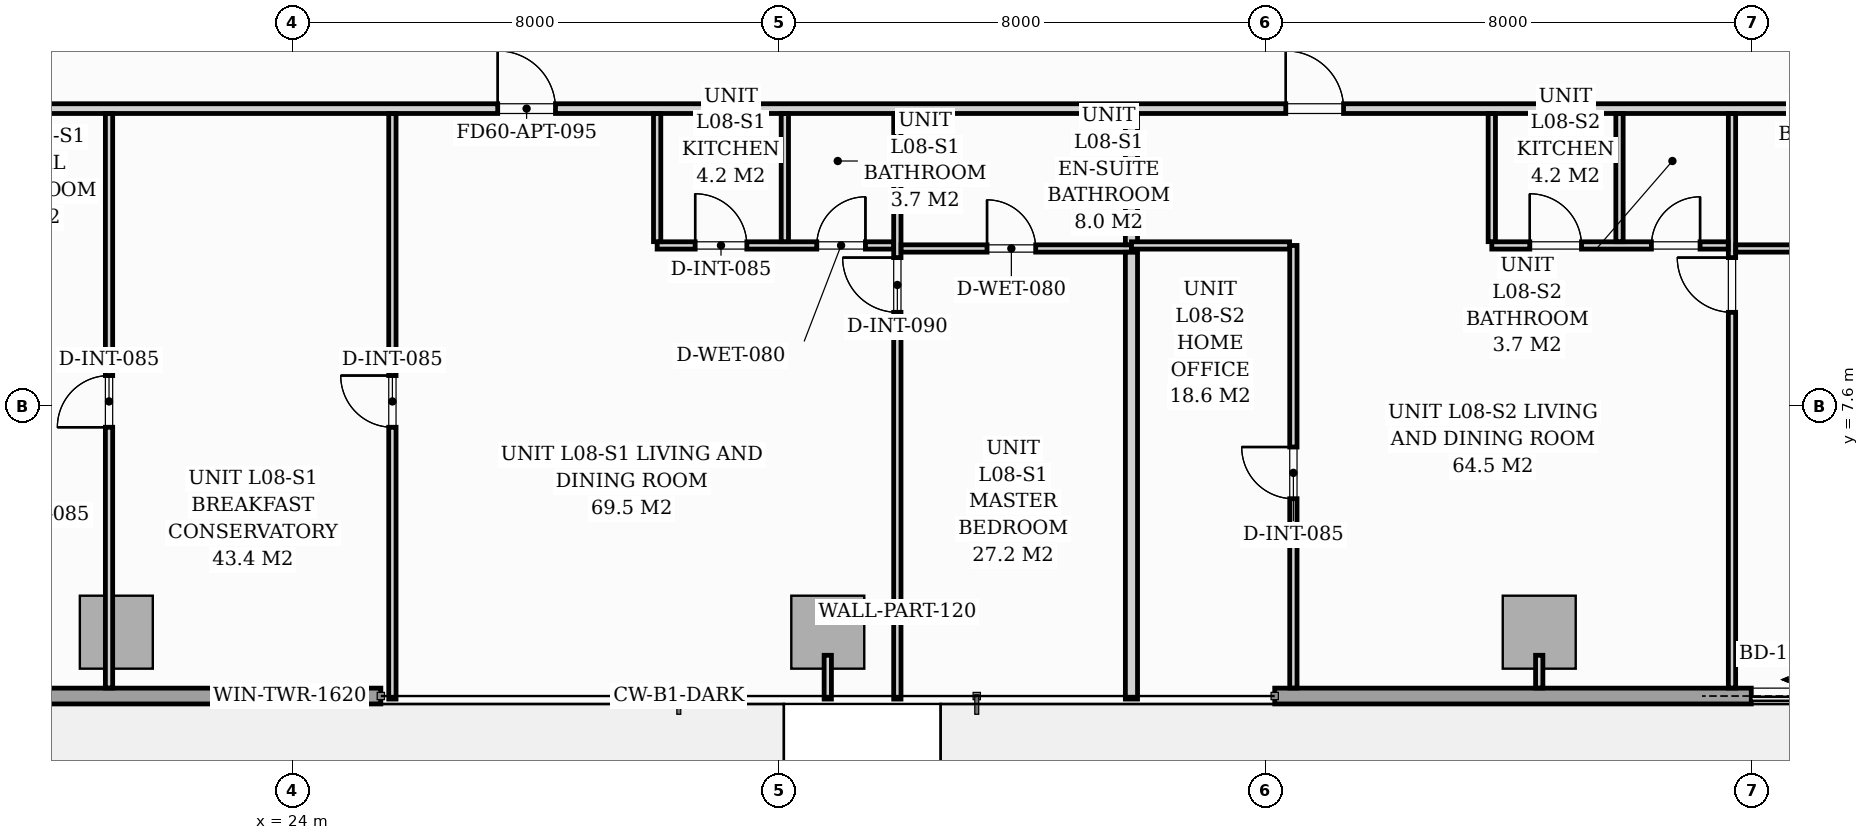
"""IFC4 building model, lengths in metres.
Left out: names, types, materials, properties, quantities, classifications, styles, units other than length and angle.
Written with IfcOpenShell. Run it as: python <this file> out.ifc"""

import sys

from ifc_helpers import new_model, si_unit, direction, frame, frame_2d, origin, origin_2d, place, context, subcontext, project, spatial, rectangle, extrude, source, transform, mapped, element, fill, save


model = new_model("IFC4")
c1 = context("Model", 3, precision=1e-05, world=origin(), true_north=direction((0.0, 1.0)))
c2 = subcontext(c1, "Body", "Model", "MODEL_VIEW")
j1 = project(units=[si_unit("LENGTHUNIT", "METRE"), si_unit("PLANEANGLEUNIT", "RADIAN")], contexts=[c1])
p1 = place(None, origin())
s1 = spatial("IfcSite", under=j1, at=p1, CompositionType="ELEMENT")
p2 = place(p1, origin())
s2 = spatial("IfcBuilding", under=s1, at=p2, CompositionType="ELEMENT")
p3 = place(p2, frame((0.0, 0.0, 32.6)))
s3 = spatial("IfcBuildingStorey", under=s2, at=p3, CompositionType="ELEMENT", Elevation=32.6)
m1 = source(origin(), c2, "Body", "SweptSolid", [
    extrude(rectangle(XDim=1.2, YDim=1.2, at=origin_2d()), origin(), (0.0, 0.0, 1.0), 3.196),
])
for number, where, z_axis, x_axis in (
    (1, (21.1, 3.88, 0.002), (0.0, 0.0, 1.0), (1.0, 0.0, 0.0)),
    (2, (32.8, 3.88, 0.002), (0.0, 0.0, 1.0), (1.0, 0.0, 0.0)),
    (3, (44.5, 3.88, 0.002), (0.0, 0.0, 1.0), (1.0, 0.0, 0.0)),
):
    element("IfcColumn", number, at=place(p3, frame(where, z_axis=z_axis, x_axis=x_axis)), inside=s3, PredefinedType="COLUMN", context=c2, shape_type="MappedRepresentation", body=[
        mapped(m1, transform((0.0, 0.0, 0.0), scale=1.0)),
    ])
p4 = place(p3, frame((57.3, 2.83, 0.0), z_axis=(0.0, 0.0, 1.0), x_axis=(-1.0, 0.0, 0.0)))
e4 = element("IfcWall", 4, at=p4, inside=s3, PredefinedType="STANDARD", context=c2, shape_type="SweptSolid", body=[
    extrude(rectangle(XDim=17.15, YDim=0.26, at=frame_2d((8.575, 0.0))), origin(), (0.0, 0.0, 1.0), 2.94),
])
p5 = place(p4, frame((7.513, 0.0, 0.0)))
e5 = element("IfcOpeningElement", 5, at=p5, cuts=e4, PredefinedType="OPENING", context=c2, shape_type="SweptSolid", body=[
    extrude(rectangle(XDim=1.8, YDim=2.06, at=frame_2d((0.9, 1.03))), frame((0.0, 0.14, 0.0), z_axis=(0.0, -1.0, 0.0), x_axis=(1.0, 0.0, 0.0)), (0.0, 0.0, 1.0), 0.28),
])
p6 = place(p4, frame((2.05, 0.0, 0.65)))
e6 = element("IfcOpeningElement", 6, at=p6, cuts=e4, PredefinedType="OPENING", context=c2, shape_type="SweptSolid", body=[
    extrude(rectangle(XDim=1.6, YDim=1.5, at=frame_2d((0.8, 0.75))), frame((0.0, 0.14, 0.0), z_axis=(0.0, -1.0, 0.0), x_axis=(1.0, 0.0, 0.0)), (0.0, 0.0, 1.0), 0.28),
])
p7 = place(p3, frame((25.45, 2.83, 0.0), z_axis=(0.0, 0.0, 1.0), x_axis=(-1.0, 0.0, 0.0)))
e7 = element("IfcWall", 7, at=p7, inside=s3, PredefinedType="STANDARD", context=c2, shape_type="SweptSolid", body=[
    extrude(rectangle(XDim=17.15, YDim=0.26, at=frame_2d((8.575, 0.0))), origin(), (0.0, 0.0, 1.0), 2.94),
])
p8 = place(p7, frame((6.93, 0.0, 0.0)))
e8 = element("IfcOpeningElement", 8, at=p8, cuts=e7, PredefinedType="OPENING", context=c2, shape_type="SweptSolid", body=[
    extrude(rectangle(XDim=1.8, YDim=2.06, at=frame_2d((0.9, 1.03))), frame((0.0, 0.14, 0.0), z_axis=(0.0, -1.0, 0.0), x_axis=(1.0, 0.0, 0.0)), (0.0, 0.0, 1.0), 0.28),
])
p9 = place(p7, frame((0.7, 0.0, 0.65)))
e9 = element("IfcOpeningElement", 9, at=p9, cuts=e7, PredefinedType="OPENING", context=c2, shape_type="SweptSolid", body=[
    extrude(rectangle(XDim=1.6, YDim=1.5, at=frame_2d((0.8, 0.75))), frame((0.0, 0.14, 0.0), z_axis=(0.0, -1.0, 0.0), x_axis=(1.0, 0.0, 0.0)), (0.0, 0.0, 1.0), 0.28),
])
p10 = place(p3, frame((16.3, 12.49, 0.0), z_axis=(0.0, 0.0, 1.0), x_axis=(1.0, 0.0, 0.0)))
e10 = element("IfcWall", 10, at=p10, inside=s3, PredefinedType="PARTITIONING", context=c2, shape_type="SweptSolid", body=[
    extrude(rectangle(XDim=35.2, YDim=0.16, at=frame_2d((17.6, 0.0))), origin(), (0.0, 0.0, 1.0), 2.94),
])
p11 = place(p10, frame((11.072, 0.0, 0.0)))
e11 = element("IfcOpeningElement", 11, at=p11, cuts=e10, PredefinedType="OPENING", context=c2, shape_type="SweptSolid", body=[
    extrude(rectangle(XDim=0.95, YDim=2.06, at=frame_2d((0.475, 1.03))), frame((0.0, 0.09, 0.0), z_axis=(0.0, -1.0, 0.0), x_axis=(1.0, 0.0, 0.0)), (0.0, 0.0, 1.0), 0.18),
])
p12 = place(p10, frame((24.032, 0.0, 0.0)))
e12 = element("IfcOpeningElement", 12, at=p12, cuts=e10, PredefinedType="OPENING", context=c2, shape_type="SweptSolid", body=[
    extrude(rectangle(XDim=0.95, YDim=2.06, at=frame_2d((0.475, 1.03))), frame((0.0, 0.09, 0.0), z_axis=(0.0, -1.0, 0.0), x_axis=(1.0, 0.0, 0.0)), (0.0, 0.0, 1.0), 0.18),
])
p13 = place(p3, frame((33.944, 2.78, 0.0), z_axis=(0.0, 0.0, 1.0), x_axis=(0.0, 1.0, 0.0)))
e13 = element("IfcWall", 13, at=p13, inside=s3, PredefinedType="PARTITIONING", context=c2, shape_type="SweptSolid", body=[
    extrude(rectangle(XDim=9.628, YDim=0.12, at=frame_2d((4.814, 0.0))), origin(), (0.0, 0.0, 1.0), 2.94),
])
p14 = place(p13, frame((6.36, 0.0, 0.0)))
e14 = element("IfcOpeningElement", 14, at=p14, cuts=e13, PredefinedType="OPENING", context=c2, shape_type="SweptSolid", body=[
    extrude(rectangle(XDim=0.9, YDim=2.05, at=frame_2d((0.45, 1.025))), frame((0.0, 0.07, 0.0), z_axis=(0.0, -1.0, 0.0), x_axis=(1.0, 0.0, 0.0)), (0.0, 0.0, 1.0), 0.14),
])
p15 = place(p3, frame((29.994, 10.24, 0.0), z_axis=(0.0, 0.0, 1.0), x_axis=(1.0, 0.0, 0.0)))
e15 = element("IfcWall", 15, at=p15, inside=s3, PredefinedType="PARTITIONING", context=c2, shape_type="SweptSolid", body=[
    extrude(rectangle(XDim=3.888, YDim=0.12, at=frame_2d((1.944, 0.0))), origin(), (0.0, 0.0, 1.0), 2.94),
])
p16 = place(p15, frame((0.625, 0.0, 0.0)))
e16 = element("IfcOpeningElement", 16, at=p16, cuts=e15, PredefinedType="OPENING", context=c2, shape_type="SweptSolid", body=[
    extrude(rectangle(XDim=0.85, YDim=2.05, at=frame_2d((0.425, 1.025))), frame((0.0, 0.07, 0.0), z_axis=(0.0, -1.0, 0.0), x_axis=(1.0, 0.0, 0.0)), (0.0, 0.0, 1.0), 0.14),
])
p17 = place(p15, frame((2.625, 0.0, 0.0)))
e17 = element("IfcOpeningElement", 17, at=p17, cuts=e15, PredefinedType="OPENING", context=c2, shape_type="SweptSolid", body=[
    extrude(rectangle(XDim=0.8, YDim=2.02, at=frame_2d((0.4, 1.01))), frame((0.0, 0.07, 0.0), z_axis=(0.0, -1.0, 0.0), x_axis=(1.0, 0.0, 0.0)), (0.0, 0.0, 1.0), 0.14),
])
for number, where, z_axis, x_axis in (
    (18, (32.094, 10.302, 0.0), (0.0, 0.0, 1.0), (0.0, 1.0, 0.0)),
    (19, (29.994, 10.302, 0.0), (0.0, 0.0, 1.0), (0.0, 1.0, 0.0)),
):
    element("IfcWall", number, at=place(p3, frame(where, z_axis=z_axis, x_axis=x_axis)), inside=s3, PredefinedType="PARTITIONING", context=c2, shape_type="SweptSolid", body=[
        extrude(rectangle(XDim=2.106, YDim=0.12, at=frame_2d((1.053, 0.0))), origin(), (0.0, 0.0, 1.0), 2.94),
    ])
p18 = place(p3, frame((34.006, 10.19, 0.0), z_axis=(0.0, 0.0, 1.0), x_axis=(1.0, 0.0, 0.0)))
e20 = element("IfcWall", 20, at=p18, inside=s3, PredefinedType="PARTITIONING", context=c2, shape_type="SweptSolid", body=[
    extrude(rectangle(XDim=3.788, YDim=0.12, at=frame_2d((1.894, 0.0))), origin(), (0.0, 0.0, 1.0), 2.94),
])
p19 = place(p18, frame((1.413, 0.0, 0.0)))
e21 = element("IfcOpeningElement", 21, at=p19, cuts=e20, PredefinedType="OPENING", context=c2, shape_type="SweptSolid", body=[
    extrude(rectangle(XDim=0.8, YDim=2.02, at=frame_2d((0.4, 1.01))), frame((0.0, 0.07, 0.0), z_axis=(0.0, -1.0, 0.0), x_axis=(1.0, 0.0, 0.0)), (0.0, 0.0, 1.0), 0.14),
])
p20 = place(p3, frame((20.98, 2.962, 0.0), z_axis=(0.0, 0.0, 1.0), x_axis=(0.0, 1.0, 0.0)))
e22 = element("IfcWall", 22, at=p20, inside=s3, PredefinedType="PARTITIONING", context=c2, shape_type="SweptSolid", body=[
    extrude(rectangle(XDim=9.446, YDim=0.12, at=frame_2d((4.723, 0.0))), origin(), (0.0, 0.0, 1.0), 2.94),
])
p21 = place(p20, frame((4.288, 0.0, 0.0)))
e23 = element("IfcOpeningElement", 23, at=p21, cuts=e22, PredefinedType="OPENING", context=c2, shape_type="SweptSolid", body=[
    extrude(rectangle(XDim=0.85, YDim=2.05, at=frame_2d((0.425, 1.025))), frame((0.0, 0.07, 0.0), z_axis=(0.0, -1.0, 0.0), x_axis=(1.0, 0.0, 0.0)), (0.0, 0.0, 1.0), 0.14),
])
p22 = place(p3, frame((25.64, 2.78, 0.0), z_axis=(0.0, 0.0, 1.0), x_axis=(0.0, 1.0, 0.0)))
e24 = element("IfcWall", 24, at=p22, inside=s3, PredefinedType="PARTITIONING", context=c2, shape_type="SweptSolid", body=[
    extrude(rectangle(XDim=9.628, YDim=0.12, at=frame_2d((4.814, 0.0))), origin(), (0.0, 0.0, 1.0), 2.94),
])
p23 = place(p22, frame((4.47, 0.0, 0.0)))
e25 = element("IfcOpeningElement", 25, at=p23, cuts=e24, PredefinedType="OPENING", context=c2, shape_type="SweptSolid", body=[
    extrude(rectangle(XDim=0.85, YDim=2.05, at=frame_2d((0.425, 1.025))), frame((0.0, 0.07, 0.0), z_axis=(0.0, -1.0, 0.0), x_axis=(1.0, 0.0, 0.0)), (0.0, 0.0, 1.0), 0.14),
])
p24 = place(p3, frame((37.794, 2.78, 0.0), z_axis=(0.0, 0.0, 1.0), x_axis=(0.0, 1.0, 0.0)))
e26 = element("IfcWall", 26, at=p24, inside=s3, PredefinedType="PARTITIONING", context=c2, shape_type="SweptSolid", body=[
    extrude(rectangle(XDim=7.348, YDim=0.2, at=frame_2d((3.674, 0.0))), origin(), (0.0, 0.0, 1.0), 2.94),
])
p25 = place(p3, frame((37.794, 10.252, 0.0), z_axis=(0.0, 0.0, 1.0), x_axis=(0.0, 1.0, 0.0)))
e27 = element("IfcWall", 27, at=p25, inside=s3, PredefinedType="PARTITIONING", context=c2, shape_type="SweptSolid", body=[
    extrude(rectangle(XDim=2.156, YDim=0.2, at=frame_2d((1.078, 0.0))), origin(), (0.0, 0.0, 1.0), 2.94),
])
p26 = place(p3, frame((47.67, 2.962, 0.0), z_axis=(0.0, 0.0, 1.0), x_axis=(0.0, 1.0, 0.0)))
e28 = element("IfcWall", 28, at=p26, inside=s3, PredefinedType="PARTITIONING", context=c2, shape_type="SweptSolid", body=[
    extrude(rectangle(XDim=9.446, YDim=0.12, at=frame_2d((4.723, 0.0))), origin(), (0.0, 0.0, 1.0), 2.94),
])
p27 = place(p26, frame((6.178, 0.0, 0.0)))
e29 = element("IfcOpeningElement", 29, at=p27, cuts=e28, PredefinedType="OPENING", context=c2, shape_type="SweptSolid", body=[
    extrude(rectangle(XDim=0.9, YDim=2.05, at=frame_2d((0.45, 1.025))), frame((0.0, 0.07, 0.0), z_axis=(0.0, -1.0, 0.0), x_axis=(1.0, 0.0, 0.0)), (0.0, 0.0, 1.0), 0.14),
])
p28 = place(p3, frame((43.72, 10.24, 0.0), z_axis=(0.0, 0.0, 1.0), x_axis=(1.0, 0.0, 0.0)))
e30 = element("IfcWall", 30, at=p28, inside=s3, PredefinedType="PARTITIONING", context=c2, shape_type="SweptSolid", body=[
    extrude(rectangle(XDim=3.888, YDim=0.12, at=frame_2d((1.944, 0.0))), origin(), (0.0, 0.0, 1.0), 2.94),
])
p29 = place(p28, frame((0.625, 0.0, 0.0)))
e31 = element("IfcOpeningElement", 31, at=p29, cuts=e30, PredefinedType="OPENING", context=c2, shape_type="SweptSolid", body=[
    extrude(rectangle(XDim=0.85, YDim=2.05, at=frame_2d((0.425, 1.025))), frame((0.0, 0.07, 0.0), z_axis=(0.0, -1.0, 0.0), x_axis=(1.0, 0.0, 0.0)), (0.0, 0.0, 1.0), 0.14),
])
p30 = place(p28, frame((2.625, 0.0, 0.0)))
e32 = element("IfcOpeningElement", 32, at=p30, cuts=e30, PredefinedType="OPENING", context=c2, shape_type="SweptSolid", body=[
    extrude(rectangle(XDim=0.8, YDim=2.02, at=frame_2d((0.4, 1.01))), frame((0.0, 0.07, 0.0), z_axis=(0.0, -1.0, 0.0), x_axis=(1.0, 0.0, 0.0)), (0.0, 0.0, 1.0), 0.14),
])
for number, where, z_axis, x_axis in (
    (33, (45.82, 10.302, 0.0), (0.0, 0.0, 1.0), (0.0, 1.0, 0.0)),
    (34, (43.72, 10.302, 0.0), (0.0, 0.0, 1.0), (0.0, 1.0, 0.0)),
):
    element("IfcWall", number, at=place(p3, frame(where, z_axis=z_axis, x_axis=x_axis)), inside=s3, PredefinedType="PARTITIONING", context=c2, shape_type="SweptSolid", body=[
        extrude(rectangle(XDim=2.106, YDim=0.12, at=frame_2d((1.053, 0.0))), origin(), (0.0, 0.0, 1.0), 2.94),
    ])
p31 = place(p3, frame((47.732, 10.19, 0.0), z_axis=(0.0, 0.0, 1.0), x_axis=(1.0, 0.0, 0.0)))
e35 = element("IfcWall", 35, at=p31, inside=s3, PredefinedType="PARTITIONING", context=c2, shape_type="SweptSolid", body=[
    extrude(rectangle(XDim=3.686, YDim=0.12, at=frame_2d((1.843, 0.0))), origin(), (0.0, 0.0, 1.0), 2.94),
])
p32 = place(p31, frame((1.413, 0.0, 0.0)))
e36 = element("IfcOpeningElement", 36, at=p32, cuts=e35, PredefinedType="OPENING", context=c2, shape_type="SweptSolid", body=[
    extrude(rectangle(XDim=0.8, YDim=2.02, at=frame_2d((0.4, 1.01))), frame((0.0, 0.07, 0.0), z_axis=(0.0, -1.0, 0.0), x_axis=(1.0, 0.0, 0.0)), (0.0, 0.0, 1.0), 0.14),
])
p33 = place(p3, frame((40.457, 2.962, 0.0), z_axis=(0.0, 0.0, 1.0), x_axis=(0.0, 1.0, 0.0)))
e37 = element("IfcWall", 37, at=p33, inside=s3, PredefinedType="PARTITIONING", context=c2, shape_type="SweptSolid", body=[
    extrude(rectangle(XDim=7.278, YDim=0.12, at=frame_2d((3.639, 0.0))), origin(), (0.0, 0.0, 1.0), 2.94),
])
p34 = place(p33, frame((3.113, 0.0, 0.0)))
e38 = element("IfcOpeningElement", 38, at=p34, cuts=e37, PredefinedType="OPENING", context=c2, shape_type="SweptSolid", body=[
    extrude(rectangle(XDim=0.85, YDim=2.05, at=frame_2d((0.425, 1.025))), frame((0.0, 0.07, 0.0), z_axis=(0.0, -1.0, 0.0), x_axis=(1.0, 0.0, 0.0)), (0.0, 0.0, 1.0), 0.14),
])
p35 = place(p3, frame((37.794, 10.24, 0.0), z_axis=(0.0, 0.0, 1.0), x_axis=(1.0, 0.0, 0.0)))
e39 = element("IfcWall", 39, at=p35, inside=s3, PredefinedType="PARTITIONING", context=c2, shape_type="SweptSolid", body=[
    extrude(rectangle(XDim=2.601, YDim=0.12, at=frame_2d((1.301, 0.0))), origin(), (0.0, 0.0, 1.0), 2.94),
])
p36 = place(p3, frame((32.8, 3.5, 0.0), z_axis=(0.0, 0.0, 1.0), x_axis=(0.0, -1.0, 0.0)))
e40 = element("IfcWall", 40, at=p36, inside=s3, PredefinedType="PARTITIONING", context=c2, shape_type="SweptSolid", body=[
    extrude(rectangle(XDim=0.72, YDim=0.12, at=frame_2d((0.36, 0.0))), origin(), (0.0, 0.0, 1.0), 2.94),
])
p37 = place(p3, frame((44.5, 3.5, 0.0), z_axis=(0.0, 0.0, 1.0), x_axis=(0.0, -1.0, 0.0)))
e41 = element("IfcWall", 41, at=p37, inside=s3, PredefinedType="PARTITIONING", context=c2, shape_type="SweptSolid", body=[
    extrude(rectangle(XDim=0.538, YDim=0.12, at=frame_2d((0.269, 0.0))), origin(), (0.0, 0.0, 1.0), 2.94),
])
m2 = source(origin(), c2, "Body", "SweptSolid", [
    extrude(rectangle(XDim=1.6, YDim=1.5, at=frame_2d((0.8, 0.75))), frame((0.0, 0.03, 0.0), z_axis=(0.0, -1.0, 0.0), x_axis=(1.0, 0.0, 0.0)), (0.0, 0.0, 1.0), 0.06),
])
p38 = place(p9, origin())
e42 = element("IfcWindow", 42, at=p38, inside=s3, PartitioningType="SINGLE_PANEL", PredefinedType="WINDOW", context=c2, shape_type="MappedRepresentation", body=[
    mapped(m2, transform((0.0, 0.0, 0.0), scale=1.0)),
])
fill(e9, e42)
m3 = source(origin(), c2, "Body", "SweptSolid", [
    extrude(rectangle(XDim=1.8, YDim=2.06, at=frame_2d((0.9, 1.03))), frame((0.0, 0.025, 0.0), z_axis=(0.0, -1.0, 0.0), x_axis=(1.0, 0.0, 0.0)), (0.0, 0.0, 1.0), 0.05),
])
p39 = place(p5, origin())
e43 = element("IfcDoor", 43, at=p39, inside=s3, OperationType="SLIDING_TO_RIGHT", PredefinedType="DOOR", context=c2, shape_type="MappedRepresentation", body=[
    mapped(m3, transform((0.0, 0.0, 0.0), scale=1.0)),
])
fill(e5, e43)
m4 = source(origin(), c2, "Body", "SweptSolid", [
    extrude(rectangle(XDim=0.8, YDim=2.02, at=frame_2d((0.4, 1.01))), frame((0.0, 0.025, 0.0), z_axis=(0.0, -1.0, 0.0), x_axis=(1.0, 0.0, 0.0)), (0.0, 0.0, 1.0), 0.05),
])
p40 = place(p19, origin())
e44 = element("IfcDoor", 44, at=p40, inside=s3, OperationType="SINGLE_SWING_LEFT", PredefinedType="DOOR", context=c2, shape_type="MappedRepresentation", body=[
    mapped(m4, transform((0.0, 0.0, 0.0), scale=1.0)),
])
fill(e21, e44)
m5 = source(origin(), c2, "Body", "SweptSolid", [
    extrude(rectangle(XDim=0.85, YDim=2.05, at=frame_2d((0.425, 1.025))), frame((0.0, 0.025, 0.0), z_axis=(0.0, -1.0, 0.0), x_axis=(1.0, 0.0, 0.0)), (0.0, 0.0, 1.0), 0.05),
])
p41 = place(p21, origin())
e45 = element("IfcDoor", 45, at=p41, inside=s3, OperationType="SINGLE_SWING_LEFT", PredefinedType="DOOR", context=c2, shape_type="MappedRepresentation", body=[
    mapped(m5, transform((0.0, 0.0, 0.0), scale=1.0)),
])
fill(e23, e45)
p42 = place(p23, origin())
e46 = element("IfcDoor", 46, at=p42, inside=s3, OperationType="SINGLE_SWING_RIGHT", PredefinedType="DOOR", context=c2, shape_type="MappedRepresentation", body=[
    mapped(m5, transform((0.0, 0.0, 0.0), scale=1.0)),
])
fill(e25, e46)
m6 = source(origin(), c2, "Body", "SweptSolid", [
    extrude(rectangle(XDim=0.95, YDim=2.06, at=frame_2d((0.475, 1.03))), frame((0.0, 0.025, 0.0), z_axis=(0.0, -1.0, 0.0), x_axis=(1.0, 0.0, 0.0)), (0.0, 0.0, 1.0), 0.05),
])
p43 = place(p11, origin())
e47 = element("IfcDoor", 47, at=p43, inside=s3, OperationType="SINGLE_SWING_LEFT", PredefinedType="DOOR", context=c2, shape_type="MappedRepresentation", body=[
    mapped(m6, transform((0.0, 0.0, 0.0), scale=1.0)),
])
fill(e11, e47)
m7 = source(origin(), c2, "Body", "SweptSolid", [
    extrude(rectangle(XDim=0.9, YDim=2.05, at=frame_2d((0.45, 1.025))), frame((0.0, 0.025, 0.0), z_axis=(0.0, -1.0, 0.0), x_axis=(1.0, 0.0, 0.0)), (0.0, 0.0, 1.0), 0.05),
])
p44 = place(p14, origin())
e48 = element("IfcDoor", 48, at=p44, inside=s3, OperationType="SINGLE_SWING_RIGHT", PredefinedType="DOOR", context=c2, shape_type="MappedRepresentation", body=[
    mapped(m7, transform((0.0, 0.0, 0.0), scale=1.0)),
])
fill(e14, e48)
p45 = place(p16, origin())
e49 = element("IfcDoor", 49, at=p45, inside=s3, OperationType="SINGLE_SWING_LEFT", PredefinedType="DOOR", context=c2, shape_type="MappedRepresentation", body=[
    mapped(m5, transform((0.0, 0.0, 0.0), scale=1.0)),
])
fill(e16, e49)
p46 = place(p17, origin())
e50 = element("IfcDoor", 50, at=p46, inside=s3, OperationType="SINGLE_SWING_RIGHT", PredefinedType="DOOR", context=c2, shape_type="MappedRepresentation", body=[
    mapped(m4, transform((0.0, 0.0, 0.0), scale=1.0)),
])
fill(e17, e50)
p47 = place(p34, origin())
e51 = element("IfcDoor", 51, at=p47, inside=s3, OperationType="SINGLE_SWING_RIGHT", PredefinedType="DOOR", context=c2, shape_type="MappedRepresentation", body=[
    mapped(m5, transform((0.0, 0.0, 0.0), scale=1.0)),
])
fill(e38, e51)
p48 = place(p12, origin())
e52 = element("IfcDoor", 52, at=p48, inside=s3, OperationType="SINGLE_SWING_LEFT", PredefinedType="DOOR", context=c2, shape_type="MappedRepresentation", body=[
    mapped(m6, transform((0.0, 0.0, 0.0), scale=1.0)),
])
fill(e12, e52)
p49 = place(p27, origin())
e53 = element("IfcDoor", 53, at=p49, inside=s3, OperationType="SINGLE_SWING_RIGHT", PredefinedType="DOOR", context=c2, shape_type="MappedRepresentation", body=[
    mapped(m7, transform((0.0, 0.0, 0.0), scale=1.0)),
])
fill(e29, e53)
p50 = place(p29, origin())
e54 = element("IfcDoor", 54, at=p50, inside=s3, OperationType="SINGLE_SWING_LEFT", PredefinedType="DOOR", context=c2, shape_type="MappedRepresentation", body=[
    mapped(m5, transform((0.0, 0.0, 0.0), scale=1.0)),
])
fill(e31, e54)
p51 = place(p30, origin())
e55 = element("IfcDoor", 55, at=p51, inside=s3, OperationType="SINGLE_SWING_RIGHT", PredefinedType="DOOR", context=c2, shape_type="MappedRepresentation", body=[
    mapped(m4, transform((0.0, 0.0, 0.0), scale=1.0)),
])
fill(e32, e55)
save(model, sys.argv[1])
